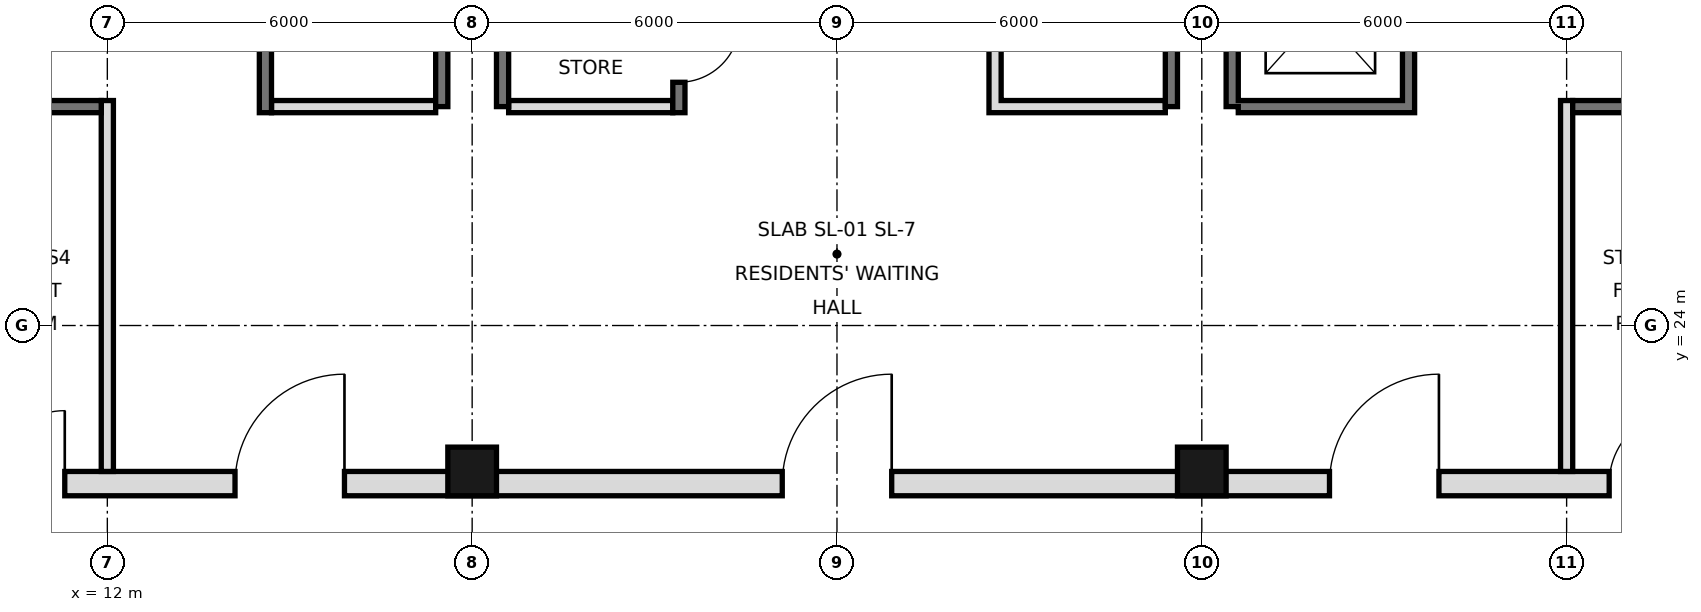
"""IFC4 building model, lengths in metres.
Left out: names, types, materials, properties, quantities, classifications, styles, units other than length and angle.
Written with IfcOpenShell. Run it as: python <this file> out.ifc"""

import sys

from ifc_helpers import new_model, si_unit, direction, frame, frame_2d, origin, origin_2d, place, context, subcontext, project, spatial, rectangle, hollow_rectangle, extrude, element, fill, save


model = new_model("IFC4")
c1 = context("Model", 3, precision=1e-05, world=origin(), true_north=direction((0.0, 1.0)))
c2 = subcontext(c1, "Body", "Model", "MODEL_VIEW")
j1 = project(units=[si_unit("LENGTHUNIT", "METRE"), si_unit("PLANEANGLEUNIT", "RADIAN")], contexts=[c1])
p1 = place(None, origin())
s1 = spatial("IfcSite", under=j1, at=p1, CompositionType="ELEMENT")
p2 = place(p1, origin())
s2 = spatial("IfcBuilding", under=s1, at=p2, CompositionType="ELEMENT")
p3 = place(p2, frame((0.0, 0.0, 294.4)))
s3 = spatial("IfcBuildingStorey", under=s2, at=p3, CompositionType="ELEMENT", Elevation=294.4)
for number, where, z_axis, x_axis in (
    (1, (18.0, 21.6, 0.0), (0.0, 0.0, 1.0), (1.0, 0.0, 0.0)),
    (2, (30.0, 21.6, 0.0), (0.0, 0.0, 1.0), (1.0, 0.0, 0.0)),
):
    element("IfcColumn", number, at=place(p3, frame(where, z_axis=z_axis, x_axis=x_axis)), inside=s3, PredefinedType="COLUMN", context=c2, shape_type="SweptSolid", body=[
        extrude(hollow_rectangle(XDim=0.8, YDim=0.8, WallThickness=0.032, at=origin_2d()), origin(), (0.0, 0.0, 1.0), 3.6),
    ])
for number, where, z_axis, x_axis in (
    (3, (17.5, 27.6, 0.0), (0.0, 0.0, 1.0), (0.0, 1.0, 0.0)),
    (4, (18.5, 27.6, 0.0), (0.0, 0.0, 1.0), (0.0, 1.0, 0.0)),
    (5, (29.5, 27.6, 0.0), (0.0, 0.0, 1.0), (0.0, 1.0, 0.0)),
    (6, (30.5, 27.6, 0.0), (0.0, 0.0, 1.0), (0.0, 1.0, 0.0)),
):
    element("IfcWall", number, at=place(p3, frame(where, z_axis=z_axis, x_axis=x_axis)), inside=s3, PredefinedType="SOLIDWALL", context=c2, shape_type="SweptSolid", body=[
        extrude(rectangle(XDim=17.5, YDim=0.2, at=frame_2d((8.75, 0.0))), origin(), (0.0, 0.0, 1.0), 3.42),
    ])
p4 = place(p3, frame((5.6, 21.4, 0.0), z_axis=(0.0, 0.0, 1.0), x_axis=(1.0, 0.0, 0.0)))
e7 = element("IfcWall", 7, at=p4, inside=s3, PredefinedType="SOLIDWALL", context=c2, shape_type="SweptSolid", body=[
    extrude(rectangle(XDim=36.8, YDim=0.4, at=frame_2d((18.4, 0.0))), origin(), (0.0, 0.0, 1.0), 3.42),
])
p5 = place(p4, frame((8.5, 0.0, 0.0)))
e8 = element("IfcOpeningElement", 8, at=p5, cuts=e7, PredefinedType="OPENING", context=c2, shape_type="SweptSolid", body=[
    extrude(rectangle(XDim=1.8, YDim=2.1, at=frame_2d((0.9, 1.05))), frame((0.0, 0.21, 0.0), z_axis=(0.0, -1.0, 0.0), x_axis=(1.0, 0.0, 0.0)), (0.0, 0.0, 1.0), 0.42),
])
p6 = place(p4, frame((17.5, 0.0, 0.0)))
e9 = element("IfcOpeningElement", 9, at=p6, cuts=e7, PredefinedType="OPENING", context=c2, shape_type="SweptSolid", body=[
    extrude(rectangle(XDim=1.8, YDim=2.1, at=frame_2d((0.9, 1.05))), frame((0.0, 0.21, 0.0), z_axis=(0.0, -1.0, 0.0), x_axis=(1.0, 0.0, 0.0)), (0.0, 0.0, 1.0), 0.42),
])
p7 = place(p4, frame((26.5, 0.0, 0.0)))
e10 = element("IfcOpeningElement", 10, at=p7, cuts=e7, PredefinedType="OPENING", context=c2, shape_type="SweptSolid", body=[
    extrude(rectangle(XDim=1.8, YDim=2.1, at=frame_2d((0.9, 1.05))), frame((0.0, 0.21, 0.0), z_axis=(0.0, -1.0, 0.0), x_axis=(1.0, 0.0, 0.0)), (0.0, 0.0, 1.0), 0.42),
])
p8 = place(p4, frame((4.5, 0.0, 0.0)))
e11 = element("IfcOpeningElement", 11, at=p8, cuts=e7, PredefinedType="OPENING", context=c2, shape_type="SweptSolid", body=[
    extrude(rectangle(XDim=1.2, YDim=2.1, at=frame_2d((0.6, 1.05))), frame((0.0, 0.21, 0.0), z_axis=(0.0, -1.0, 0.0), x_axis=(1.0, 0.0, 0.0)), (0.0, 0.0, 1.0), 0.42),
])
p9 = place(p4, frame((31.1, 0.0, 0.0)))
e12 = element("IfcOpeningElement", 12, at=p9, cuts=e7, PredefinedType="OPENING", context=c2, shape_type="SweptSolid", body=[
    extrude(rectangle(XDim=1.2, YDim=2.1, at=frame_2d((0.6, 1.05))), frame((0.0, 0.21, 0.0), z_axis=(0.0, -1.0, 0.0), x_axis=(1.0, 0.0, 0.0)), (0.0, 0.0, 1.0), 0.42),
])
p10 = place(p3, frame((12.0, 21.6, 0.0), z_axis=(0.0, 0.0, 1.0), x_axis=(0.0, 1.0, 0.0)))
e13 = element("IfcWall", 13, at=p10, inside=s3, PredefinedType="PARTITIONING", context=c2, shape_type="SweptSolid", body=[
    extrude(rectangle(XDim=6.1, YDim=0.2, at=frame_2d((3.05, 0.0))), origin(), (0.0, 0.0, 1.0), 3.42),
])
p11 = place(p3, frame((14.6, 27.5, 0.0), z_axis=(0.0, 0.0, 1.0), x_axis=(0.0, 1.0, 0.0)))
e14 = element("IfcWall", 14, at=p11, inside=s3, PredefinedType="SOLIDWALL", context=c2, shape_type="SweptSolid", body=[
    extrude(rectangle(XDim=17.5, YDim=0.2, at=frame_2d((8.75, 0.0))), origin(), (0.0, 0.0, 1.0), 3.42),
])
p12 = place(p11, frame((15.4, 0.0, 0.0)))
e15 = element("IfcOpeningElement", 15, at=p12, cuts=e14, PredefinedType="OPENING", context=c2, shape_type="SweptSolid", body=[
    extrude(rectangle(XDim=1.1, YDim=2.1, at=frame_2d((0.55, 1.05))), frame((0.0, 0.11, 0.0), z_axis=(0.0, -1.0, 0.0), x_axis=(1.0, 0.0, 0.0)), (0.0, 0.0, 1.0), 0.22),
])
p13 = place(p11, frame((2.7, 0.0, 0.0)))
e16 = element("IfcOpeningElement", 16, at=p13, cuts=e14, PredefinedType="OPENING", context=c2, shape_type="SweptSolid", body=[
    extrude(rectangle(XDim=1.0, YDim=2.1, at=frame_2d((0.5, 1.05))), frame((0.0, 0.11, 0.0), z_axis=(0.0, -1.0, 0.0), x_axis=(1.0, 0.0, 0.0)), (0.0, 0.0, 1.0), 0.22),
])
p14 = place(p11, frame((9.9, 0.0, 0.0)))
e17 = element("IfcOpeningElement", 17, at=p14, cuts=e14, PredefinedType="OPENING", context=c2, shape_type="SweptSolid", body=[
    extrude(rectangle(XDim=0.9, YDim=2.1, at=frame_2d((0.45, 1.05))), frame((0.0, 0.11, 0.0), z_axis=(0.0, -1.0, 0.0), x_axis=(1.0, 0.0, 0.0)), (0.0, 0.0, 1.0), 0.22),
])
p15 = place(p3, frame((21.4, 27.5, 0.0), z_axis=(0.0, 0.0, 1.0), x_axis=(0.0, 1.0, 0.0)))
e18 = element("IfcWall", 18, at=p15, inside=s3, PredefinedType="SOLIDWALL", context=c2, shape_type="SweptSolid", body=[
    extrude(rectangle(XDim=17.5, YDim=0.2, at=frame_2d((8.75, 0.0))), origin(), (0.0, 0.0, 1.0), 3.42),
])
p16 = place(p15, frame((0.5, 0.0, 0.0)))
e19 = element("IfcOpeningElement", 19, at=p16, cuts=e18, PredefinedType="OPENING", context=c2, shape_type="SweptSolid", body=[
    extrude(rectangle(XDim=1.0, YDim=2.1, at=frame_2d((0.5, 1.05))), frame((0.0, 0.11, 0.0), z_axis=(0.0, -1.0, 0.0), x_axis=(1.0, 0.0, 0.0)), (0.0, 0.0, 1.0), 0.22),
])
p17 = place(p15, frame((3.6, 0.0, 0.0)))
e20 = element("IfcOpeningElement", 20, at=p17, cuts=e18, PredefinedType="OPENING", context=c2, shape_type="SweptSolid", body=[
    extrude(rectangle(XDim=1.0, YDim=2.1, at=frame_2d((0.5, 1.05))), frame((0.0, 0.11, 0.0), z_axis=(0.0, -1.0, 0.0), x_axis=(1.0, 0.0, 0.0)), (0.0, 0.0, 1.0), 0.22),
])
p18 = place(p15, frame((16.2, 0.0, 0.0)))
e21 = element("IfcOpeningElement", 21, at=p18, cuts=e18, PredefinedType="OPENING", context=c2, shape_type="SweptSolid", body=[
    extrude(rectangle(XDim=1.0, YDim=2.1, at=frame_2d((0.5, 1.05))), frame((0.0, 0.11, 0.0), z_axis=(0.0, -1.0, 0.0), x_axis=(1.0, 0.0, 0.0)), (0.0, 0.0, 1.0), 0.22),
])
p19 = place(p15, frame((7.4, 0.0, 0.0)))
e22 = element("IfcOpeningElement", 22, at=p19, cuts=e18, PredefinedType="OPENING", context=c2, shape_type="SweptSolid", body=[
    extrude(rectangle(XDim=0.9, YDim=2.1, at=frame_2d((0.45, 1.05))), frame((0.0, 0.11, 0.0), z_axis=(0.0, -1.0, 0.0), x_axis=(1.0, 0.0, 0.0)), (0.0, 0.0, 1.0), 0.22),
])
p20 = place(p3, frame((26.6, 27.5, 0.0), z_axis=(0.0, 0.0, 1.0), x_axis=(0.0, 1.0, 0.0)))
e23 = element("IfcWall", 23, at=p20, inside=s3, PredefinedType="SOLIDWALL", context=c2, shape_type="SweptSolid", body=[
    extrude(rectangle(XDim=17.5, YDim=0.2, at=frame_2d((8.75, 0.0))), origin(), (0.0, 0.0, 1.0), 3.42),
])
p21 = place(p20, frame((4.3, 0.0, 0.0)))
e24 = element("IfcOpeningElement", 24, at=p21, cuts=e23, PredefinedType="OPENING", context=c2, shape_type="SweptSolid", body=[
    extrude(rectangle(XDim=0.9, YDim=2.1, at=frame_2d((0.45, 1.05))), frame((0.0, 0.11, 0.0), z_axis=(0.0, -1.0, 0.0), x_axis=(1.0, 0.0, 0.0)), (0.0, 0.0, 1.0), 0.22),
])
p22 = place(p20, frame((10.35, 0.0, 0.0)))
e25 = element("IfcOpeningElement", 25, at=p22, cuts=e23, PredefinedType="OPENING", context=c2, shape_type="SweptSolid", body=[
    extrude(rectangle(XDim=1.0, YDim=2.1, at=frame_2d((0.5, 1.05))), frame((0.0, 0.11, 0.0), z_axis=(0.0, -1.0, 0.0), x_axis=(1.0, 0.0, 0.0)), (0.0, 0.0, 1.0), 0.22),
])
p23 = place(p20, frame((14.575, 0.0, 0.0)))
e26 = element("IfcOpeningElement", 26, at=p23, cuts=e23, PredefinedType="OPENING", context=c2, shape_type="SweptSolid", body=[
    extrude(rectangle(XDim=1.0, YDim=2.1, at=frame_2d((0.5, 1.05))), frame((0.0, 0.11, 0.0), z_axis=(0.0, -1.0, 0.0), x_axis=(1.0, 0.0, 0.0)), (0.0, 0.0, 1.0), 0.22),
])
p24 = place(p3, frame((33.4, 27.5, 0.0), z_axis=(0.0, 0.0, 1.0), x_axis=(0.0, 1.0, 0.0)))
e27 = element("IfcWall", 27, at=p24, inside=s3, PredefinedType="SOLIDWALL", context=c2, shape_type="SweptSolid", body=[
    extrude(rectangle(XDim=17.5, YDim=0.2, at=frame_2d((8.75, 0.0))), origin(), (0.0, 0.0, 1.0), 3.42),
])
p25 = place(p24, frame((1.1, 0.0, 0.0)))
e28 = element("IfcOpeningElement", 28, at=p25, cuts=e27, PredefinedType="OPENING", context=c2, shape_type="SweptSolid", body=[
    extrude(rectangle(XDim=1.1, YDim=2.1, at=frame_2d((0.55, 1.05))), frame((0.0, 0.11, 0.0), z_axis=(0.0, -1.0, 0.0), x_axis=(1.0, 0.0, 0.0)), (0.0, 0.0, 1.0), 0.22),
])
p26 = place(p24, frame((4.2, 0.0, 0.0)))
e29 = element("IfcOpeningElement", 29, at=p26, cuts=e27, PredefinedType="OPENING", context=c2, shape_type="SweptSolid", body=[
    extrude(rectangle(XDim=1.1, YDim=2.1, at=frame_2d((0.55, 1.05))), frame((0.0, 0.11, 0.0), z_axis=(0.0, -1.0, 0.0), x_axis=(1.0, 0.0, 0.0)), (0.0, 0.0, 1.0), 0.22),
])
p27 = place(p24, frame((15.4, 0.0, 0.0)))
e30 = element("IfcOpeningElement", 30, at=p27, cuts=e27, PredefinedType="OPENING", context=c2, shape_type="SweptSolid", body=[
    extrude(rectangle(XDim=1.1, YDim=2.1, at=frame_2d((0.55, 1.05))), frame((0.0, 0.11, 0.0), z_axis=(0.0, -1.0, 0.0), x_axis=(1.0, 0.0, 0.0)), (0.0, 0.0, 1.0), 0.22),
])
p28 = place(p24, frame((9.9, 0.0, 0.0)))
e31 = element("IfcOpeningElement", 31, at=p28, cuts=e27, PredefinedType="OPENING", context=c2, shape_type="SweptSolid", body=[
    extrude(rectangle(XDim=0.9, YDim=2.1, at=frame_2d((0.45, 1.05))), frame((0.0, 0.11, 0.0), z_axis=(0.0, -1.0, 0.0), x_axis=(1.0, 0.0, 0.0)), (0.0, 0.0, 1.0), 0.22),
])
p29 = place(p3, frame((36.0, 21.6, 0.0), z_axis=(0.0, 0.0, 1.0), x_axis=(0.0, 1.0, 0.0)))
e32 = element("IfcWall", 32, at=p29, inside=s3, PredefinedType="PARTITIONING", context=c2, shape_type="SweptSolid", body=[
    extrude(rectangle(XDim=6.1, YDim=0.2, at=frame_2d((3.05, 0.0))), origin(), (0.0, 0.0, 1.0), 3.42),
])
for number, where, z_axis, x_axis in (
    (33, (14.7, 27.6, 0.0), (0.0, 0.0, 1.0), (1.0, 0.0, 0.0)),
    (34, (18.6, 27.6, 0.0), (0.0, 0.0, 1.0), (1.0, 0.0, 0.0)),
):
    element("IfcWall", number, at=place(p3, frame(where, z_axis=z_axis, x_axis=x_axis)), inside=s3, PredefinedType="PARTITIONING", context=c2, shape_type="SweptSolid", body=[
        extrude(rectangle(XDim=2.7, YDim=0.2, at=frame_2d((1.35, 0.0))), origin(), (0.0, 0.0, 1.0), 3.42),
    ])
for number, where, z_axis, x_axis in (
    (35, (26.7, 27.6, 0.0), (0.0, 0.0, 1.0), (1.0, 0.0, 0.0)),
    (36, (30.6, 27.6, 0.0), (0.0, 0.0, 1.0), (1.0, 0.0, 0.0)),
):
    element("IfcWall", number, at=place(p3, frame(where, z_axis=z_axis, x_axis=x_axis)), inside=s3, PredefinedType="SOLIDWALL", context=c2, shape_type="SweptSolid", body=[
        extrude(rectangle(XDim=2.7, YDim=0.2, at=frame_2d((1.35, 0.0))), origin(), (0.0, 0.0, 1.0), 3.42),
    ])
for number, where, z_axis, x_axis in (
    (37, (36.1, 27.6, 0.0), (0.0, 0.0, 1.0), (1.0, 0.0, 0.0)),
    (38, (6.6, 27.6, 0.0), (0.0, 0.0, 1.0), (1.0, 0.0, 0.0)),
):
    element("IfcWall", number, at=place(p3, frame(where, z_axis=z_axis, x_axis=x_axis)), inside=s3, PredefinedType="SOLIDWALL", context=c2, shape_type="SweptSolid", body=[
        extrude(rectangle(XDim=5.3, YDim=0.2, at=frame_2d((2.65, 0.0))), origin(), (0.0, 0.0, 1.0), 3.42),
    ])
p30 = place(p5, frame((1.8, 0.0, 0.0), z_axis=(0.0, 0.0, 1.0), x_axis=(-1.0, 0.0, 0.0)))
e39 = element("IfcDoor", 39, at=p30, inside=s3, OperationType="SINGLE_SWING_LEFT", PredefinedType="DOOR", context=c2, shape_type="SweptSolid", body=[
    extrude(rectangle(XDim=1.8, YDim=2.1, at=frame_2d((0.9, 1.05))), frame((0.0, 0.025, 0.0), z_axis=(0.0, -1.0, 0.0), x_axis=(1.0, 0.0, 0.0)), (0.0, 0.0, 1.0), 0.05),
])
fill(e8, e39)
p31 = place(p6, frame((1.8, 0.0, 0.0), z_axis=(0.0, 0.0, 1.0), x_axis=(-1.0, 0.0, 0.0)))
e40 = element("IfcDoor", 40, at=p31, inside=s3, OperationType="SINGLE_SWING_LEFT", PredefinedType="DOOR", context=c2, shape_type="SweptSolid", body=[
    extrude(rectangle(XDim=1.8, YDim=2.1, at=frame_2d((0.9, 1.05))), frame((0.0, 0.025, 0.0), z_axis=(0.0, -1.0, 0.0), x_axis=(1.0, 0.0, 0.0)), (0.0, 0.0, 1.0), 0.05),
])
fill(e9, e40)
p32 = place(p7, frame((1.8, 0.0, 0.0), z_axis=(0.0, 0.0, 1.0), x_axis=(-1.0, 0.0, 0.0)))
e41 = element("IfcDoor", 41, at=p32, inside=s3, OperationType="SINGLE_SWING_LEFT", PredefinedType="DOOR", context=c2, shape_type="SweptSolid", body=[
    extrude(rectangle(XDim=1.8, YDim=2.1, at=frame_2d((0.9, 1.05))), frame((0.0, 0.025, 0.0), z_axis=(0.0, -1.0, 0.0), x_axis=(1.0, 0.0, 0.0)), (0.0, 0.0, 1.0), 0.05),
])
fill(e10, e41)
p33 = place(p8, frame((1.2, 0.0, 0.0), z_axis=(0.0, 0.0, 1.0), x_axis=(-1.0, 0.0, 0.0)))
e42 = element("IfcDoor", 42, at=p33, inside=s3, OperationType="SINGLE_SWING_LEFT", PredefinedType="DOOR", context=c2, shape_type="SweptSolid", body=[
    extrude(rectangle(XDim=1.2, YDim=2.1, at=frame_2d((0.6, 1.05))), frame((0.0, 0.025, 0.0), z_axis=(0.0, -1.0, 0.0), x_axis=(1.0, 0.0, 0.0)), (0.0, 0.0, 1.0), 0.05),
])
fill(e11, e42)
p34 = place(p9, frame((1.2, 0.0, 0.0), z_axis=(0.0, 0.0, 1.0), x_axis=(-1.0, 0.0, 0.0)))
e43 = element("IfcDoor", 43, at=p34, inside=s3, OperationType="SINGLE_SWING_LEFT", PredefinedType="DOOR", context=c2, shape_type="SweptSolid", body=[
    extrude(rectangle(XDim=1.2, YDim=2.1, at=frame_2d((0.6, 1.05))), frame((0.0, 0.025, 0.0), z_axis=(0.0, -1.0, 0.0), x_axis=(1.0, 0.0, 0.0)), (0.0, 0.0, 1.0), 0.05),
])
fill(e12, e43)
p35 = place(p16, origin())
e44 = element("IfcDoor", 44, at=p35, inside=s3, OperationType="SINGLE_SWING_RIGHT", PredefinedType="DOOR", context=c2, shape_type="SweptSolid", body=[
    extrude(rectangle(XDim=1.0, YDim=2.1, at=frame_2d((0.5, 1.05))), frame((0.0, 0.025, 0.0), z_axis=(0.0, -1.0, 0.0), x_axis=(1.0, 0.0, 0.0)), (0.0, 0.0, 1.0), 0.05),
])
fill(e19, e44)
save(model, sys.argv[1])
